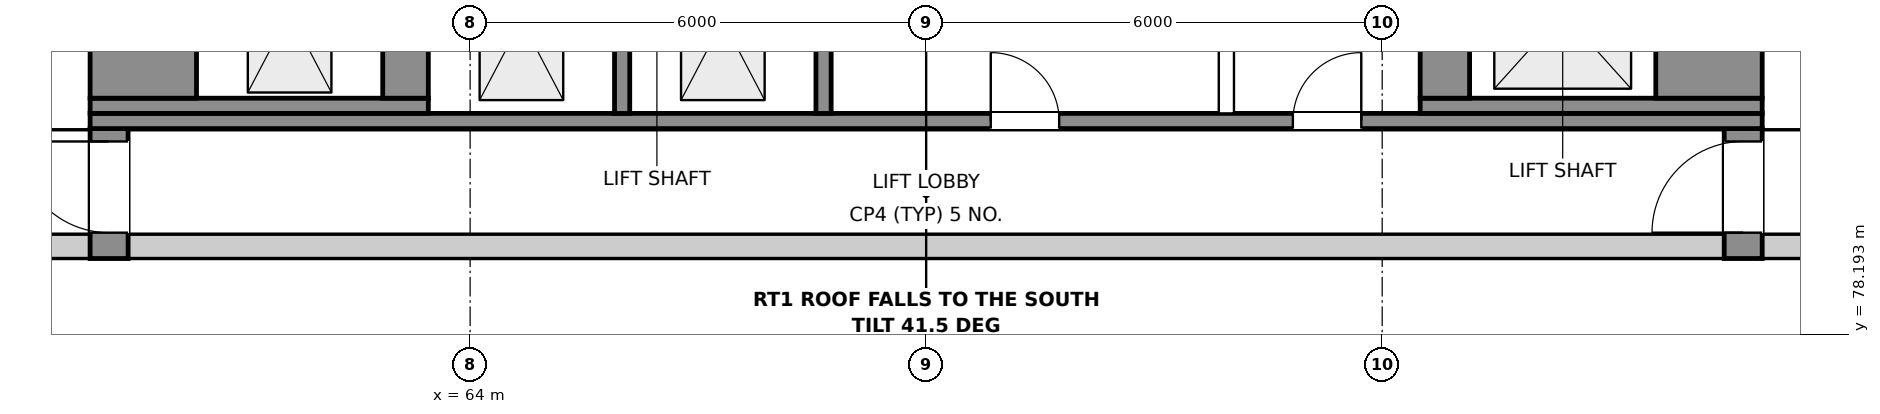
"""IFC4 building model, lengths in metres.
Left out: names, types, materials, properties, quantities, classifications, styles, units other than length and angle.
Written with IfcOpenShell. Run it as: python <this file> out.ifc"""

import sys

from ifc_helpers import new_model, si_unit, direction, frame, frame_2d, origin, place, context, subcontext, project, spatial, polyline, rectangle, outline, extrude, element, fill, save


model = new_model("IFC4")
c1 = context("Model", 3, precision=1e-05, world=origin(), true_north=direction((0.0, 1.0)))
c2 = subcontext(c1, "Body", "Model", "MODEL_VIEW")
j1 = project(units=[si_unit("LENGTHUNIT", "METRE"), si_unit("PLANEANGLEUNIT", "RADIAN")], contexts=[c1])
p1 = place(None, origin())
s1 = spatial("IfcSite", under=j1, at=p1, CompositionType="ELEMENT")
p2 = place(p1, origin())
s2 = spatial("IfcBuilding", under=s1, at=p2, CompositionType="ELEMENT")
p3 = place(p2, frame((0.0, 0.0, 351.2)))
s3 = spatial("IfcBuildingStorey", under=s2, at=p3, CompositionType="ELEMENT", Elevation=351.2)
p4 = place(p3, frame((53.604, 79.351, 0.0), z_axis=(0.0, 0.0, 1.0), x_axis=(1.0, 0.0, 0.0)))
e1 = element("IfcWall", 1, at=p4, inside=s3, PredefinedType="SOLIDWALL", context=c2, shape_type="SweptSolid", body=[
    extrude(rectangle(XDim=5.396, YDim=0.32, at=frame_2d((2.698, 0.0))), origin(), (0.0, 0.0, 1.0), 2.842),
])
p5 = place(p3, frame((59.5, 79.351, 0.0), z_axis=(0.0, 0.0, 1.0), x_axis=(1.0, 0.0, 0.0)))
e2 = element("IfcWall", 2, at=p5, inside=s3, PredefinedType="SOLIDWALL", context=c2, shape_type="SweptSolid", body=[
    extrude(rectangle(XDim=21.0, YDim=0.32, at=frame_2d((10.5, 0.0))), origin(), (0.0, 0.0, 1.0), 2.842),
])
p6 = place(p3, frame((81.0, 79.351, 0.0), z_axis=(0.0, 0.0, 1.0), x_axis=(1.0, 0.0, 0.0)))
e3 = element("IfcWall", 3, at=p6, inside=s3, PredefinedType="SOLIDWALL", context=c2, shape_type="SweptSolid", body=[
    extrude(rectangle(XDim=5.396, YDim=0.32, at=frame_2d((2.698, 0.0))), origin(), (0.0, 0.0, 1.0), 2.842),
])
p7 = place(p3, frame((59.25, 79.191, 0.0), z_axis=(0.0, 0.0, 1.0), x_axis=(0.0, 1.0, 0.0)))
e4 = element("IfcWall", 4, at=p7, inside=s3, PredefinedType="SHEAR", context=c2, shape_type="SweptSolid", body=[
    extrude(outline(polyline([(0.0, 0.0), (1.709, 0.0), (1.709, 4.163), (0.0, 2.65), (0.0, 0.0)])), frame((0.0, 0.25, 0.0), z_axis=(0.0, -1.0, 0.0), x_axis=(1.0, 0.0, 0.0)), (0.0, 0.0, 1.0), 0.5),
])
p8 = place(p7, frame((0.34, 0.0, 0.0)))
e5 = element("IfcOpeningElement", 5, at=p8, cuts=e4, PredefinedType="OPENING", context=c2, shape_type="SweptSolid", body=[
    extrude(rectangle(XDim=1.2, YDim=2.1, at=frame_2d((0.6, 1.05))), frame((0.0, 0.26, 0.0), z_axis=(0.0, -1.0, 0.0), x_axis=(1.0, 0.0, 0.0)), (0.0, 0.0, 1.0), 0.52),
])
p9 = place(p3, frame((80.75, 79.191, 0.0), z_axis=(0.0, 0.0, 1.0), x_axis=(0.0, 1.0, 0.0)))
e6 = element("IfcWall", 6, at=p9, inside=s3, PredefinedType="SHEAR", context=c2, shape_type="SweptSolid", body=[
    extrude(outline(polyline([(0.0, 0.0), (1.709, 0.0), (1.709, 4.163), (0.0, 2.65), (0.0, 0.0)])), frame((0.0, 0.25, 0.0), z_axis=(0.0, -1.0, 0.0), x_axis=(1.0, 0.0, 0.0)), (0.0, 0.0, 1.0), 0.5),
])
p10 = place(p9, frame((0.34, 0.0, 0.0)))
e7 = element("IfcOpeningElement", 7, at=p10, cuts=e6, PredefinedType="OPENING", context=c2, shape_type="SweptSolid", body=[
    extrude(rectangle(XDim=1.2, YDim=2.1, at=frame_2d((0.6, 1.05))), frame((0.0, 0.26, 0.0), z_axis=(0.0, -1.0, 0.0), x_axis=(1.0, 0.0, 0.0)), (0.0, 0.0, 1.0), 0.52),
])
p11 = place(p3, frame((59.0, 81.0, 0.0), z_axis=(0.0, 0.0, 1.0), x_axis=(1.0, 0.0, 0.0)))
e8 = element("IfcWall", 8, at=p11, inside=s3, PredefinedType="SHEAR", context=c2, shape_type="SweptSolid", body=[
    extrude(rectangle(XDim=22.0, YDim=0.2, at=frame_2d((11.0, 0.0))), origin(), (0.0, 0.0, 1.0), 4.252),
])
p12 = place(p11, frame((11.85, 0.0, 0.0)))
e9 = element("IfcOpeningElement", 9, at=p12, cuts=e8, PredefinedType="OPENING", context=c2, shape_type="SweptSolid", body=[
    extrude(rectangle(XDim=0.9, YDim=2.1, at=frame_2d((0.45, 1.05))), frame((0.0, 0.11, 0.0), z_axis=(0.0, -1.0, 0.0), x_axis=(1.0, 0.0, 0.0)), (0.0, 0.0, 1.0), 0.22),
])
p13 = place(p11, frame((15.825, 0.0, 0.0)))
e10 = element("IfcOpeningElement", 10, at=p13, cuts=e8, PredefinedType="OPENING", context=c2, shape_type="SweptSolid", body=[
    extrude(rectangle(XDim=0.9, YDim=2.1, at=frame_2d((0.45, 1.05))), frame((0.0, 0.11, 0.0), z_axis=(0.0, -1.0, 0.0), x_axis=(1.0, 0.0, 0.0)), (0.0, 0.0, 1.0), 0.22),
])
p14 = place(p3, frame((59.0, 81.2, 0.0), z_axis=(0.0, 0.0, 1.0), x_axis=(1.0, 0.0, 0.0)))
e11 = element("IfcWall", 11, at=p14, inside=s3, PredefinedType="SHEAR", context=c2, shape_type="SweptSolid", body=[
    extrude(rectangle(XDim=4.45, YDim=0.2, at=frame_2d((2.225, 0.0))), origin(), (0.0, 0.0, 1.0), 4.429),
])
for number, where, z_axis, x_axis in (
    (12, (66.0, 81.1, 0.0), (0.0, 0.0, 1.0), (0.0, 1.0, 0.0)),
    (13, (68.65, 81.1, 0.0), (0.0, 0.0, 1.0), (0.0, 1.0, 0.0)),
):
    element("IfcWall", number, at=place(p3, frame(where, z_axis=z_axis, x_axis=x_axis)), inside=s3, PredefinedType="SHEAR", context=c2, shape_type="SweptSolid", body=[
        extrude(outline(polyline([(0.0, 0.0), (2.45, 0.0), (2.45, 4.5), (0.0, 4.341), (0.0, 0.0)])), frame((0.0, 0.1, 0.0), z_axis=(0.0, -1.0, 0.0), x_axis=(1.0, 0.0, 0.0)), (0.0, 0.0, 1.0), 0.2),
    ])
p15 = place(p3, frame((73.95, 81.1, 0.0), z_axis=(0.0, 0.0, 1.0), x_axis=(0.0, 1.0, 0.0)))
e14 = element("IfcWall", 14, at=p15, inside=s3, PredefinedType="PARTITIONING", context=c2, shape_type="SweptSolid", body=[
    extrude(rectangle(XDim=2.45, YDim=0.2, at=frame_2d((1.225, 0.0))), origin(), (0.0, 0.0, 1.0), 4.2),
])
p16 = place(p3, frame((76.5, 81.2, 0.0), z_axis=(0.0, 0.0, 1.0), x_axis=(1.0, 0.0, 0.0)))
e15 = element("IfcWall", 15, at=p16, inside=s3, PredefinedType="SHEAR", context=c2, shape_type="SweptSolid", body=[
    extrude(rectangle(XDim=4.5, YDim=0.2, at=frame_2d((2.25, 0.0))), origin(), (0.0, 0.0, 1.0), 4.429),
])
p17 = place(p3, frame((59.7, 81.3, 0.0), z_axis=(0.0, 0.0, 1.0), x_axis=(0.0, 1.0, 0.0)))
e16 = element("IfcWall", 16, at=p17, inside=s3, PredefinedType="SHEAR", context=c2, shape_type="SweptSolid", body=[
    extrude(rectangle(XDim=2.25, YDim=1.4, at=frame_2d((1.125, 0.0))), origin(), (0.0, 0.0, 1.0), 4.5),
])
p18 = place(p3, frame((63.15, 81.3, 0.0), z_axis=(0.0, 0.0, 1.0), x_axis=(0.0, 1.0, 0.0)))
e17 = element("IfcWall", 17, at=p18, inside=s3, PredefinedType="SHEAR", context=c2, shape_type="SweptSolid", body=[
    extrude(rectangle(XDim=2.25, YDim=0.6, at=frame_2d((1.125, 0.0))), origin(), (0.0, 0.0, 1.0), 4.5),
])
p19 = place(p3, frame((76.825, 81.3, 0.0), z_axis=(0.0, 0.0, 1.0), x_axis=(0.0, 1.0, 0.0)))
e18 = element("IfcWall", 18, at=p19, inside=s3, PredefinedType="SHEAR", context=c2, shape_type="SweptSolid", body=[
    extrude(rectangle(XDim=2.25, YDim=0.65, at=frame_2d((1.125, 0.0))), origin(), (0.0, 0.0, 1.0), 4.5),
])
p20 = place(p3, frame((80.3, 81.3, 0.0), z_axis=(0.0, 0.0, 1.0), x_axis=(0.0, 1.0, 0.0)))
e19 = element("IfcWall", 19, at=p20, inside=s3, PredefinedType="SHEAR", context=c2, shape_type="SweptSolid", body=[
    extrude(rectangle(XDim=2.25, YDim=1.4, at=frame_2d((1.125, 0.0))), origin(), (0.0, 0.0, 1.0), 4.5),
])
p21 = place(p8, origin())
e20 = element("IfcDoor", 20, at=p21, inside=s3, OperationType="SINGLE_SWING_RIGHT", PredefinedType="DOOR", context=c2, shape_type="SweptSolid", body=[
    extrude(rectangle(XDim=1.2, YDim=2.1, at=frame_2d((0.6, 1.05))), frame((0.0, 0.025, 0.0), z_axis=(0.0, -1.0, 0.0), x_axis=(1.0, 0.0, 0.0)), (0.0, 0.0, 1.0), 0.05),
])
fill(e5, e20)
p22 = place(p10, origin())
e21 = element("IfcDoor", 21, at=p22, inside=s3, OperationType="SINGLE_SWING_LEFT", PredefinedType="DOOR", context=c2, shape_type="SweptSolid", body=[
    extrude(rectangle(XDim=1.2, YDim=2.1, at=frame_2d((0.6, 1.05))), frame((0.0, 0.025, 0.0), z_axis=(0.0, -1.0, 0.0), x_axis=(1.0, 0.0, 0.0)), (0.0, 0.0, 1.0), 0.05),
])
fill(e7, e21)
p23 = place(p12, origin())
e22 = element("IfcDoor", 22, at=p23, inside=s3, OperationType="SINGLE_SWING_LEFT", PredefinedType="DOOR", context=c2, shape_type="SweptSolid", body=[
    extrude(rectangle(XDim=0.9, YDim=2.1, at=frame_2d((0.45, 1.05))), frame((0.0, 0.025, 0.0), z_axis=(0.0, -1.0, 0.0), x_axis=(1.0, 0.0, 0.0)), (0.0, 0.0, 1.0), 0.05),
])
fill(e9, e22)
p24 = place(p13, origin())
e23 = element("IfcDoor", 23, at=p24, inside=s3, OperationType="SINGLE_SWING_RIGHT", PredefinedType="DOOR", context=c2, shape_type="SweptSolid", body=[
    extrude(rectangle(XDim=0.9, YDim=2.1, at=frame_2d((0.45, 1.05))), frame((0.0, 0.025, 0.0), z_axis=(0.0, -1.0, 0.0), x_axis=(1.0, 0.0, 0.0)), (0.0, 0.0, 1.0), 0.05),
])
fill(e10, e23)
save(model, sys.argv[1])
